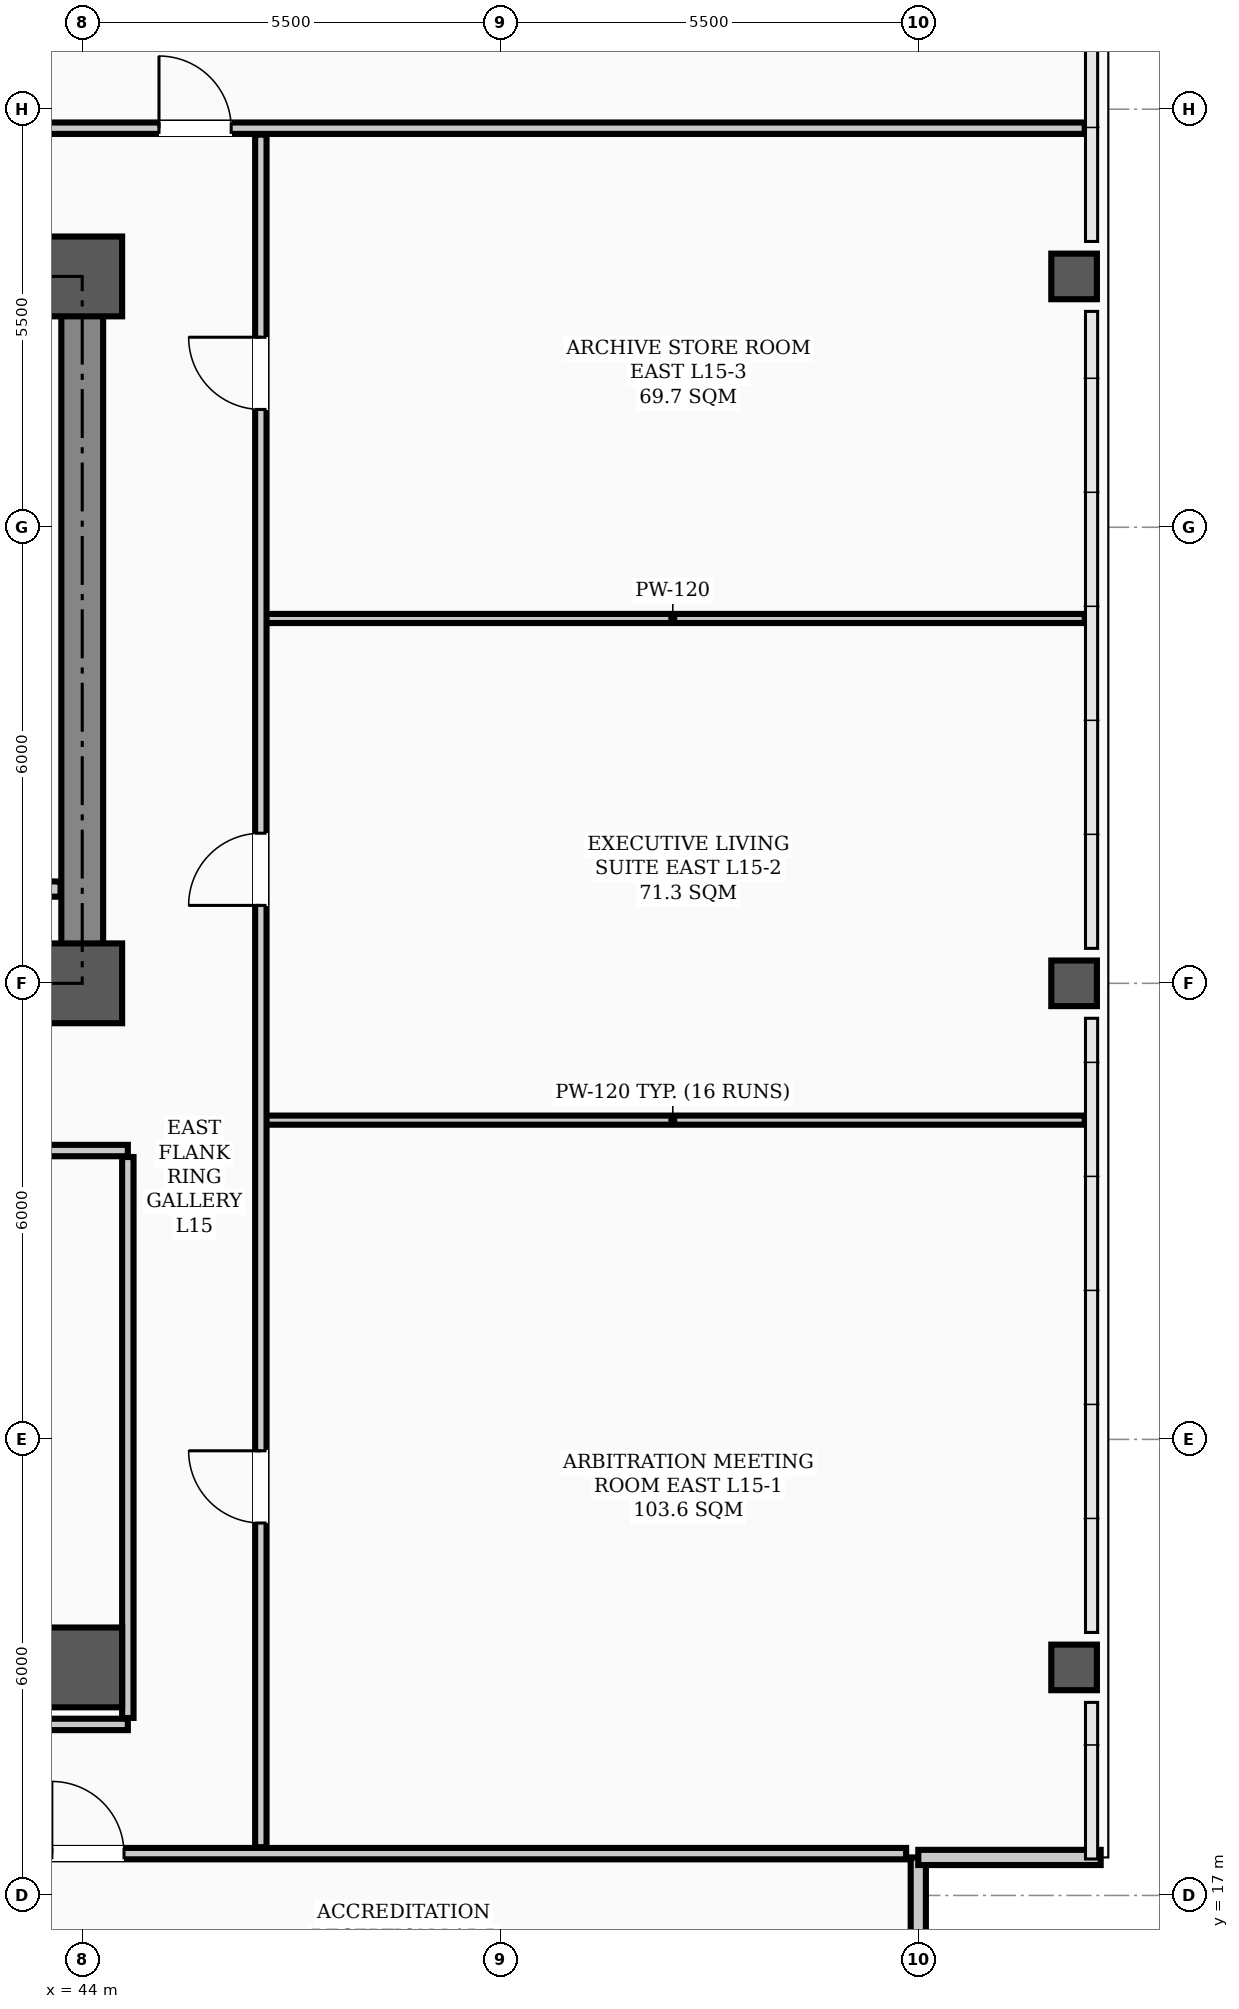
"""IFC4 building model, lengths in metres.
Left out: names, types, materials, properties, quantities, classifications, styles, units other than length and angle.
Written with IfcOpenShell. Run it as: python <this file> out.ifc"""

import sys

from ifc_helpers import new_model, si_unit, direction, frame, frame_2d, origin, origin_2d, place, context, subcontext, project, spatial, rectangle, hollow_rectangle, extrude, element, fill, save


model = new_model("IFC4")
c1 = context("Model", 3, precision=1e-05, world=origin(), true_north=direction((0.0, 1.0)))
c2 = subcontext(c1, "Body", "Model", "MODEL_VIEW")
j1 = project(units=[si_unit("LENGTHUNIT", "METRE"), si_unit("PLANEANGLEUNIT", "RADIAN")], contexts=[c1])
p1 = place(None, origin())
s1 = spatial("IfcSite", under=j1, at=p1, CompositionType="ELEMENT")
p2 = place(p1, origin())
s2 = spatial("IfcBuilding", under=s1, at=p2, CompositionType="ELEMENT")
p3 = place(p2, frame((0.0, 0.0, 61.6)))
s3 = spatial("IfcBuildingStorey", under=s2, at=p3, CompositionType="ELEMENT", Elevation=61.6)
for number, where, z_axis, x_axis in (
    (1, (44.0, 29.0, 0.0), (0.0, 0.0, 1.0), (1.0, 0.0, 0.0)),
    (2, (44.0, 38.3, 0.0), (0.0, 0.0, 1.0), (1.0, 0.0, 0.0)),
    (3, (44.0, 20.0, 0.0), (0.0, 0.0, 1.0), (1.0, 0.0, 0.0)),
):
    element("IfcColumn", number, at=place(p3, frame(where, z_axis=z_axis, x_axis=x_axis)), inside=s3, PredefinedType="COLUMN", context=c2, shape_type="SweptSolid", body=[
        extrude(hollow_rectangle(XDim=1.05, YDim=1.05, WallThickness=0.038, InnerFilletRadius=0.019, OuterFilletRadius=0.057, at=origin_2d()), origin(), (0.0, 0.0, 1.0), 3.9),
    ])
for number, where, z_axis, x_axis in (
    (4, (57.05, 20.0, 0.0), (0.0, 0.0, 1.0), (1.0, 0.0, 0.0)),
    (5, (57.05, 29.0, 0.0), (0.0, 0.0, 1.0), (1.0, 0.0, 0.0)),
    (6, (57.05, 38.3, 0.0), (0.0, 0.0, 1.0), (1.0, 0.0, 0.0)),
):
    element("IfcColumn", number, at=place(p3, frame(where, z_axis=z_axis, x_axis=x_axis)), inside=s3, PredefinedType="COLUMN", context=c2, shape_type="SweptSolid", body=[
        extrude(hollow_rectangle(XDim=0.6, YDim=0.6, WallThickness=0.026, InnerFilletRadius=0.013, OuterFilletRadius=0.039, at=origin_2d()), origin(), (0.0, 0.0, 1.0), 3.9),
    ])
for number, where, z_axis, x_axis in (
    (7, (55.0, 15.1, 0.0), (0.0, 0.0, 1.0), (0.0, 1.0, 0.0)),
    (8, (55.0, 17.5, 0.0), (0.0, 0.0, 1.0), (1.0, 0.0, 0.0)),
):
    element("IfcWall", number, at=place(p3, frame(where, z_axis=z_axis, x_axis=x_axis)), inside=s3, PredefinedType="PARAPET", context=c2, shape_type="SweptSolid", body=[
        extrude(rectangle(XDim=2.4, YDim=0.2, at=frame_2d((1.2, 0.0))), origin(), (0.0, 0.0, 1.0), 1.2),
    ])
p4 = place(p3, frame((13.5, 29.0, 0.0), z_axis=(0.0, 0.0, 1.0), x_axis=(1.0, 0.0, 0.0)))
e9 = element("IfcWall", 9, at=p4, inside=s3, PredefinedType="SHEAR", context=c2, shape_type="SweptSolid", body=[
    extrude(rectangle(XDim=30.5, YDim=0.55, at=frame_2d((15.25, 0.0))), origin(), (0.0, 0.0, 1.0), 3.72),
])
p5 = place(p4, frame((1.75, 0.0, 0.0)))
e10 = element("IfcOpeningElement", 10, at=p5, cuts=e9, PredefinedType="OPENING", context=c2, shape_type="SweptSolid", body=[
    extrude(rectangle(XDim=1.1, YDim=2.08, at=frame_2d((0.55, 1.04))), frame((0.0, 0.285, 0.0), z_axis=(0.0, -1.0, 0.0), x_axis=(1.0, 0.0, 0.0)), (0.0, 0.0, 1.0), 0.57),
])
p6 = place(p4, frame((26.7, 0.0, 0.0)))
e11 = element("IfcOpeningElement", 11, at=p6, cuts=e9, PredefinedType="OPENING", context=c2, shape_type="SweptSolid", body=[
    extrude(rectangle(XDim=1.1, YDim=2.08, at=frame_2d((0.55, 1.04))), frame((0.0, 0.285, 0.0), z_axis=(0.0, -1.0, 0.0), x_axis=(1.0, 0.0, 0.0)), (0.0, 0.0, 1.0), 0.57),
])
p7 = place(p4, frame((6.8, 0.0, 0.0)))
e12 = element("IfcOpeningElement", 12, at=p7, cuts=e9, PredefinedType="OPENING", context=c2, shape_type="SweptSolid", body=[
    extrude(rectangle(XDim=1.1, YDim=2.08, at=frame_2d((0.55, 1.04))), frame((0.0, 0.285, 0.0), z_axis=(0.0, -1.0, 0.0), x_axis=(1.0, 0.0, 0.0)), (0.0, 0.0, 1.0), 0.57),
])
p8 = place(p4, frame((13.2, 0.0, 0.0)))
e13 = element("IfcOpeningElement", 13, at=p8, cuts=e9, PredefinedType="OPENING", context=c2, shape_type="SweptSolid", body=[
    extrude(rectangle(XDim=1.6, YDim=2.08, at=frame_2d((0.8, 1.04))), frame((0.0, 0.285, 0.0), z_axis=(0.0, -1.0, 0.0), x_axis=(1.0, 0.0, 0.0)), (0.0, 0.0, 1.0), 0.57),
])
p9 = place(p4, frame((19.6, 0.0, 0.0)))
e14 = element("IfcOpeningElement", 14, at=p9, cuts=e9, PredefinedType="OPENING", context=c2, shape_type="SweptSolid", body=[
    extrude(rectangle(XDim=0.9, YDim=2.08, at=frame_2d((0.45, 1.04))), frame((0.0, 0.285, 0.0), z_axis=(0.0, -1.0, 0.0), x_axis=(1.0, 0.0, 0.0)), (0.0, 0.0, 1.0), 0.57),
])
p10 = place(p4, frame((21.6, 0.0, 0.0)))
e15 = element("IfcOpeningElement", 15, at=p10, cuts=e9, PredefinedType="OPENING", context=c2, shape_type="SweptSolid", body=[
    extrude(rectangle(XDim=0.9, YDim=2.08, at=frame_2d((0.45, 1.04))), frame((0.0, 0.285, 0.0), z_axis=(0.0, -1.0, 0.0), x_axis=(1.0, 0.0, 0.0)), (0.0, 0.0, 1.0), 0.57),
])
p11 = place(p3, frame((13.5, 38.3, 0.0), z_axis=(0.0, 0.0, 1.0), x_axis=(1.0, 0.0, 0.0)))
e16 = element("IfcWall", 16, at=p11, inside=s3, PredefinedType="SHEAR", context=c2, shape_type="SweptSolid", body=[
    extrude(rectangle(XDim=30.5, YDim=0.55, at=frame_2d((15.25, 0.0))), origin(), (0.0, 0.0, 1.0), 3.72),
])
p12 = place(p3, frame((44.0, 29.35, 0.0), z_axis=(0.0, 0.0, 1.0), x_axis=(0.0, 1.0, 0.0)))
e17 = element("IfcWall", 17, at=p12, inside=s3, PredefinedType="SHEAR", context=c2, shape_type="SweptSolid", body=[
    extrude(rectangle(XDim=8.6, YDim=0.55, at=frame_2d((4.3, 0.0))), origin(), (0.0, 0.0, 1.0), 3.72),
])
p13 = place(p3, frame((42.4, 30.24, 0.0), z_axis=(0.0, 0.0, 1.0), x_axis=(1.0, 0.0, 0.0)))
e18 = element("IfcWall", 18, at=p13, inside=s3, PredefinedType="STANDARD", context=c2, shape_type="SweptSolid", body=[
    extrude(rectangle(XDim=1.315, YDim=0.2, at=frame_2d((0.658, 0.0))), origin(), (0.0, 0.0, 1.0), 3.1),
])
p14 = place(p3, frame((12.9, 26.8, 0.0), z_axis=(0.0, 0.0, 1.0), x_axis=(1.0, 0.0, 0.0)))
e19 = element("IfcWall", 19, at=p14, inside=s3, PredefinedType="PARTITIONING", context=c2, shape_type="SweptSolid", body=[
    extrude(rectangle(XDim=31.7, YDim=0.15, at=frame_2d((15.85, 0.0))), origin(), (0.0, 0.0, 1.0), 3.1),
])
p15 = place(p14, frame((13.6, 0.0, 0.0)))
e20 = element("IfcOpeningElement", 20, at=p15, cuts=e19, PredefinedType="OPENING", context=c2, shape_type="SweptSolid", body=[
    extrude(rectangle(XDim=1.6, YDim=2.08, at=frame_2d((0.8, 1.04))), frame((0.0, 0.085, 0.0), z_axis=(0.0, -1.0, 0.0), x_axis=(1.0, 0.0, 0.0)), (0.0, 0.0, 1.0), 0.17),
])
p16 = place(p14, frame((2.475, 0.0, 0.0)))
e21 = element("IfcOpeningElement", 21, at=p16, cuts=e19, PredefinedType="OPENING", context=c2, shape_type="SweptSolid", body=[
    extrude(rectangle(XDim=0.95, YDim=2.08, at=frame_2d((0.475, 1.04))), frame((0.0, 0.085, 0.0), z_axis=(0.0, -1.0, 0.0), x_axis=(1.0, 0.0, 0.0)), (0.0, 0.0, 1.0), 0.17),
])
p17 = place(p14, frame((5.725, 0.0, 0.0)))
e22 = element("IfcOpeningElement", 22, at=p17, cuts=e19, PredefinedType="OPENING", context=c2, shape_type="SweptSolid", body=[
    extrude(rectangle(XDim=0.95, YDim=2.08, at=frame_2d((0.475, 1.04))), frame((0.0, 0.085, 0.0), z_axis=(0.0, -1.0, 0.0), x_axis=(1.0, 0.0, 0.0)), (0.0, 0.0, 1.0), 0.17),
])
p18 = place(p14, frame((8.875, 0.0, 0.0)))
e23 = element("IfcOpeningElement", 23, at=p18, cuts=e19, PredefinedType="OPENING", context=c2, shape_type="SweptSolid", body=[
    extrude(rectangle(XDim=0.95, YDim=2.08, at=frame_2d((0.475, 1.04))), frame((0.0, 0.085, 0.0), z_axis=(0.0, -1.0, 0.0), x_axis=(1.0, 0.0, 0.0)), (0.0, 0.0, 1.0), 0.17),
])
p19 = place(p14, frame((16.075, 0.0, 0.0)))
e24 = element("IfcOpeningElement", 24, at=p19, cuts=e19, PredefinedType="OPENING", context=c2, shape_type="SweptSolid", body=[
    extrude(rectangle(XDim=0.95, YDim=2.08, at=frame_2d((0.475, 1.04))), frame((0.0, 0.085, 0.0), z_axis=(0.0, -1.0, 0.0), x_axis=(1.0, 0.0, 0.0)), (0.0, 0.0, 1.0), 0.17),
])
p20 = place(p14, frame((22.525, 0.0, 0.0)))
e25 = element("IfcOpeningElement", 25, at=p20, cuts=e19, PredefinedType="OPENING", context=c2, shape_type="SweptSolid", body=[
    extrude(rectangle(XDim=0.95, YDim=2.08, at=frame_2d((0.475, 1.04))), frame((0.0, 0.085, 0.0), z_axis=(0.0, -1.0, 0.0), x_axis=(1.0, 0.0, 0.0)), (0.0, 0.0, 1.0), 0.17),
])
p21 = place(p14, frame((28.825, 0.0, 0.0)))
e26 = element("IfcOpeningElement", 26, at=p21, cuts=e19, PredefinedType="OPENING", context=c2, shape_type="SweptSolid", body=[
    extrude(rectangle(XDim=0.95, YDim=2.08, at=frame_2d((0.475, 1.04))), frame((0.0, 0.085, 0.0), z_axis=(0.0, -1.0, 0.0), x_axis=(1.0, 0.0, 0.0)), (0.0, 0.0, 1.0), 0.17),
])
p22 = place(p3, frame((10.16, 17.55, 0.0), z_axis=(0.0, 0.0, 1.0), x_axis=(1.0, 0.0, 0.0)))
e27 = element("IfcWall", 27, at=p22, inside=s3, PredefinedType="PARTITIONING", context=c2, shape_type="SweptSolid", body=[
    extrude(rectangle(XDim=44.68, YDim=0.15, at=frame_2d((22.34, 0.0))), origin(), (0.0, 0.0, 1.0), 3.1),
])
p23 = place(p22, frame((2.64, 0.0, 0.0)))
e28 = element("IfcOpeningElement", 28, at=p23, cuts=e27, PredefinedType="OPENING", context=c2, shape_type="SweptSolid", body=[
    extrude(rectangle(XDim=0.95, YDim=2.08, at=frame_2d((0.475, 1.04))), frame((0.0, 0.085, 0.0), z_axis=(0.0, -1.0, 0.0), x_axis=(1.0, 0.0, 0.0)), (0.0, 0.0, 1.0), 0.17),
])
p24 = place(p22, frame((8.965, 0.0, 0.0)))
e29 = element("IfcOpeningElement", 29, at=p24, cuts=e27, PredefinedType="OPENING", context=c2, shape_type="SweptSolid", body=[
    extrude(rectangle(XDim=0.95, YDim=2.08, at=frame_2d((0.475, 1.04))), frame((0.0, 0.085, 0.0), z_axis=(0.0, -1.0, 0.0), x_axis=(1.0, 0.0, 0.0)), (0.0, 0.0, 1.0), 0.17),
])
p25 = place(p22, frame((23.815, 0.0, 0.0)))
e30 = element("IfcOpeningElement", 30, at=p25, cuts=e27, PredefinedType="OPENING", context=c2, shape_type="SweptSolid", body=[
    extrude(rectangle(XDim=0.95, YDim=2.08, at=frame_2d((0.475, 1.04))), frame((0.0, 0.085, 0.0), z_axis=(0.0, -1.0, 0.0), x_axis=(1.0, 0.0, 0.0)), (0.0, 0.0, 1.0), 0.17),
])
p26 = place(p22, frame((33.44, 0.0, 0.0)))
e31 = element("IfcOpeningElement", 31, at=p26, cuts=e27, PredefinedType="OPENING", context=c2, shape_type="SweptSolid", body=[
    extrude(rectangle(XDim=0.95, YDim=2.08, at=frame_2d((0.475, 1.04))), frame((0.0, 0.085, 0.0), z_axis=(0.0, -1.0, 0.0), x_axis=(1.0, 0.0, 0.0)), (0.0, 0.0, 1.0), 0.17),
])
p27 = place(p3, frame((28.4, 19.25, 0.0), z_axis=(0.0, 0.0, 1.0), x_axis=(1.0, 0.0, 0.0)))
e32 = element("IfcWall", 32, at=p27, inside=s3, PredefinedType="PARTITIONING", context=c2, shape_type="SweptSolid", body=[
    extrude(rectangle(XDim=16.2, YDim=0.15, at=frame_2d((8.1, 0.0))), origin(), (0.0, 0.0, 1.0), 3.1),
])
for number, where, z_axis, x_axis in (
    (33, (46.35, 27.2, 0.0), (0.0, 0.0, 1.0), (1.0, 0.0, 0.0)),
    (34, (46.35, 33.8, 0.0), (0.0, 0.0, 1.0), (1.0, 0.0, 0.0)),
):
    element("IfcWall", number, at=place(p3, frame(where, z_axis=z_axis, x_axis=x_axis)), inside=s3, PredefinedType="PARTITIONING", context=c2, shape_type="SweptSolid", body=[
        extrude(rectangle(XDim=10.84, YDim=0.12, at=frame_2d((5.42, 0.0))), origin(), (0.0, 0.0, 1.0), 3.212),
    ])
p28 = place(p3, frame((7.81, 40.25, 0.0), z_axis=(0.0, 0.0, 1.0), x_axis=(1.0, 0.0, 0.0)))
e35 = element("IfcWall", 35, at=p28, inside=s3, PredefinedType="PARTITIONING", context=c2, shape_type="SweptSolid", body=[
    extrude(rectangle(XDim=49.38, YDim=0.15, at=frame_2d((24.69, 0.0))), origin(), (0.0, 0.0, 1.0), 3.1),
])
p29 = place(p28, frame((3.73, 0.0, 0.0)))
e36 = element("IfcOpeningElement", 36, at=p29, cuts=e35, PredefinedType="OPENING", context=c2, shape_type="SweptSolid", body=[
    extrude(rectangle(XDim=0.95, YDim=2.08, at=frame_2d((0.475, 1.04))), frame((0.0, 0.085, 0.0), z_axis=(0.0, -1.0, 0.0), x_axis=(1.0, 0.0, 0.0)), (0.0, 0.0, 1.0), 0.17),
])
p30 = place(p28, frame((13.815, 0.0, 0.0)))
e37 = element("IfcOpeningElement", 37, at=p30, cuts=e35, PredefinedType="OPENING", context=c2, shape_type="SweptSolid", body=[
    extrude(rectangle(XDim=0.95, YDim=2.08, at=frame_2d((0.475, 1.04))), frame((0.0, 0.085, 0.0), z_axis=(0.0, -1.0, 0.0), x_axis=(1.0, 0.0, 0.0)), (0.0, 0.0, 1.0), 0.17),
])
p31 = place(p28, frame((19.965, 0.0, 0.0)))
e38 = element("IfcOpeningElement", 38, at=p31, cuts=e35, PredefinedType="OPENING", context=c2, shape_type="SweptSolid", body=[
    extrude(rectangle(XDim=0.95, YDim=2.08, at=frame_2d((0.475, 1.04))), frame((0.0, 0.085, 0.0), z_axis=(0.0, -1.0, 0.0), x_axis=(1.0, 0.0, 0.0)), (0.0, 0.0, 1.0), 0.17),
])
p32 = place(p28, frame((30.815, 0.0, 0.0)))
e39 = element("IfcOpeningElement", 39, at=p32, cuts=e35, PredefinedType="OPENING", context=c2, shape_type="SweptSolid", body=[
    extrude(rectangle(XDim=0.95, YDim=2.08, at=frame_2d((0.475, 1.04))), frame((0.0, 0.085, 0.0), z_axis=(0.0, -1.0, 0.0), x_axis=(1.0, 0.0, 0.0)), (0.0, 0.0, 1.0), 0.17),
])
p33 = place(p28, frame((37.2, 0.0, 0.0)))
e40 = element("IfcOpeningElement", 40, at=p33, cuts=e35, PredefinedType="OPENING", context=c2, shape_type="SweptSolid", body=[
    extrude(rectangle(XDim=0.95, YDim=2.08, at=frame_2d((0.475, 1.04))), frame((0.0, 0.085, 0.0), z_axis=(0.0, -1.0, 0.0), x_axis=(1.0, 0.0, 0.0)), (0.0, 0.0, 1.0), 0.17),
])
p34 = place(p3, frame((46.35, 17.635, 0.0), z_axis=(0.0, 0.0, 1.0), x_axis=(0.0, 1.0, 0.0)))
e41 = element("IfcWall", 41, at=p34, inside=s3, PredefinedType="PARTITIONING", context=c2, shape_type="SweptSolid", body=[
    extrude(rectangle(XDim=22.53, YDim=0.15, at=frame_2d((11.265, 0.0))), origin(), (0.0, 0.0, 1.0), 3.0),
])
p35 = place(p34, frame((4.265, 0.0, 0.0)))
e42 = element("IfcOpeningElement", 42, at=p35, cuts=e41, PredefinedType="OPENING", context=c2, shape_type="SweptSolid", body=[
    extrude(rectangle(XDim=0.95, YDim=2.08, at=frame_2d((0.475, 1.04))), frame((0.0, 0.085, 0.0), z_axis=(0.0, -1.0, 0.0), x_axis=(1.0, 0.0, 0.0)), (0.0, 0.0, 1.0), 0.17),
])
p36 = place(p34, frame((12.39, 0.0, 0.0)))
e43 = element("IfcOpeningElement", 43, at=p36, cuts=e41, PredefinedType="OPENING", context=c2, shape_type="SweptSolid", body=[
    extrude(rectangle(XDim=0.95, YDim=2.08, at=frame_2d((0.475, 1.04))), frame((0.0, 0.085, 0.0), z_axis=(0.0, -1.0, 0.0), x_axis=(1.0, 0.0, 0.0)), (0.0, 0.0, 1.0), 0.17),
])
p37 = place(p34, frame((18.915, 0.0, 0.0)))
e44 = element("IfcOpeningElement", 44, at=p37, cuts=e41, PredefinedType="OPENING", context=c2, shape_type="SweptSolid", body=[
    extrude(rectangle(XDim=0.95, YDim=2.08, at=frame_2d((0.475, 1.04))), frame((0.0, 0.085, 0.0), z_axis=(0.0, -1.0, 0.0), x_axis=(1.0, 0.0, 0.0)), (0.0, 0.0, 1.0), 0.17),
])
p38 = place(p3, frame((44.6, 19.335, 0.0), z_axis=(0.0, 0.0, 1.0), x_axis=(0.0, 1.0, 0.0)))
e45 = element("IfcWall", 45, at=p38, inside=s3, PredefinedType="PARTITIONING", context=c2, shape_type="SweptSolid", body=[
    extrude(rectangle(XDim=7.38, YDim=0.15, at=frame_2d((3.69, 0.0))), origin(), (0.0, 0.0, 1.0), 3.0),
])
p39 = place(p26, origin())
e46 = element("IfcDoor", 46, at=p39, inside=s3, OperationType="SINGLE_SWING_LEFT", PredefinedType="DOOR", context=c2, shape_type="SweptSolid", body=[
    extrude(rectangle(XDim=0.95, YDim=2.08, at=frame_2d((0.475, 1.04))), frame((0.0, 0.025, 0.0), z_axis=(0.0, -1.0, 0.0), x_axis=(1.0, 0.0, 0.0)), (0.0, 0.0, 1.0), 0.05),
])
fill(e31, e46)
p40 = place(p35, origin())
e47 = element("IfcDoor", 47, at=p40, inside=s3, OperationType="SINGLE_SWING_RIGHT", PredefinedType="DOOR", context=c2, shape_type="SweptSolid", body=[
    extrude(rectangle(XDim=0.95, YDim=2.08, at=frame_2d((0.475, 1.04))), frame((0.0, 0.025, 0.0), z_axis=(0.0, -1.0, 0.0), x_axis=(1.0, 0.0, 0.0)), (0.0, 0.0, 1.0), 0.05),
])
fill(e42, e47)
p41 = place(p36, origin())
e48 = element("IfcDoor", 48, at=p41, inside=s3, OperationType="SINGLE_SWING_LEFT", PredefinedType="DOOR", context=c2, shape_type="SweptSolid", body=[
    extrude(rectangle(XDim=0.95, YDim=2.08, at=frame_2d((0.475, 1.04))), frame((0.0, 0.025, 0.0), z_axis=(0.0, -1.0, 0.0), x_axis=(1.0, 0.0, 0.0)), (0.0, 0.0, 1.0), 0.05),
])
fill(e43, e48)
p42 = place(p37, origin())
e49 = element("IfcDoor", 49, at=p42, inside=s3, OperationType="SINGLE_SWING_RIGHT", PredefinedType="DOOR", context=c2, shape_type="SweptSolid", body=[
    extrude(rectangle(XDim=0.95, YDim=2.08, at=frame_2d((0.475, 1.04))), frame((0.0, 0.025, 0.0), z_axis=(0.0, -1.0, 0.0), x_axis=(1.0, 0.0, 0.0)), (0.0, 0.0, 1.0), 0.05),
])
fill(e44, e49)
p43 = place(p33, origin())
e50 = element("IfcDoor", 50, at=p43, inside=s3, OperationType="SINGLE_SWING_LEFT", PredefinedType="DOOR", context=c2, shape_type="SweptSolid", body=[
    extrude(rectangle(XDim=0.95, YDim=2.08, at=frame_2d((0.475, 1.04))), frame((0.0, 0.025, 0.0), z_axis=(0.0, -1.0, 0.0), x_axis=(1.0, 0.0, 0.0)), (0.0, 0.0, 1.0), 0.05),
])
fill(e40, e50)
save(model, sys.argv[1])
